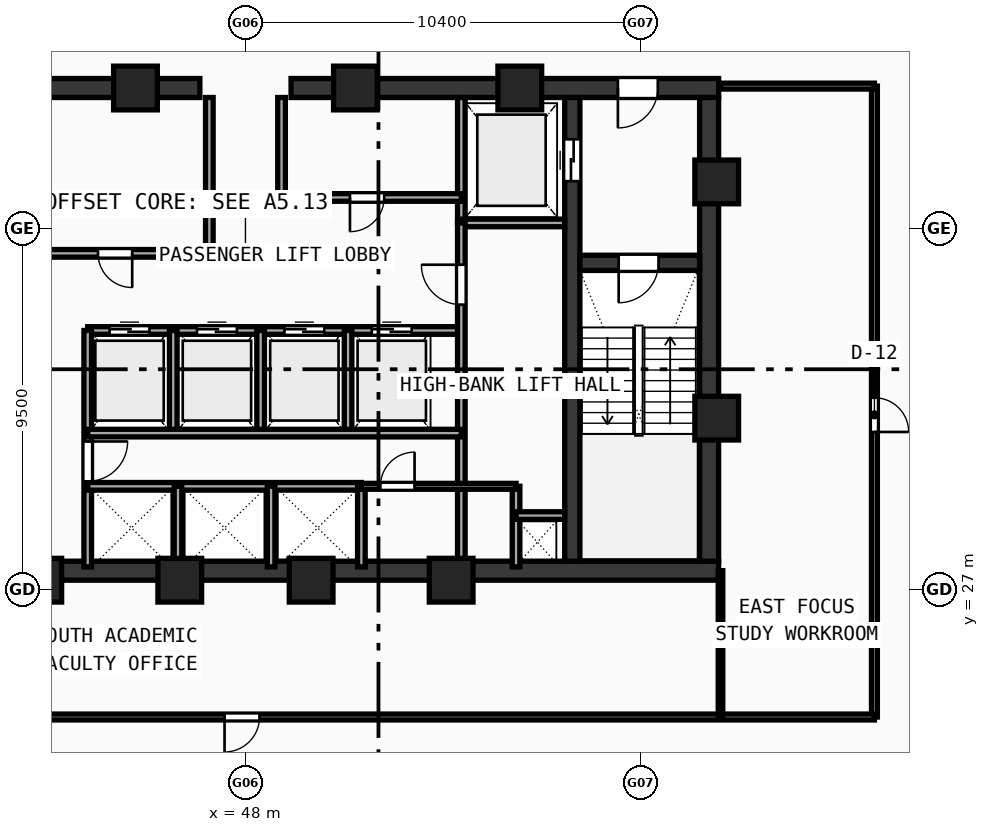
"""IFC4 building model, lengths in metres.
Left out: names, types, materials, properties, quantities, classifications, styles, units other than length and angle.
Written with IfcOpenShell. Run it as: python <this file> out.ifc"""

import sys

from ifc_helpers import new_model, si_unit, direction, frame, frame_2d, origin, origin_with_axes, origin_2d, place, context, subcontext, project, spatial, rectangle, hollow_rectangle, extrude, source, transform, mapped, element, fill, save


model = new_model("IFC4")
c1 = context("Model", 3, precision=1e-05, world=origin(), true_north=direction((0.0, 1.0)))
c2 = subcontext(c1, "Body", "Model", "MODEL_VIEW")
j1 = project(units=[si_unit("LENGTHUNIT", "METRE"), si_unit("PLANEANGLEUNIT", "RADIAN")], contexts=[c1])
p1 = place(None, origin())
s1 = spatial("IfcSite", under=j1, at=p1, CompositionType="ELEMENT")
p2 = place(p1, origin())
s2 = spatial("IfcBuilding", under=s1, at=p2, CompositionType="ELEMENT")
p3 = place(p2, frame((0.0, 0.0, 199.96)))
s3 = spatial("IfcBuildingStorey", under=s2, at=p3, CompositionType="ELEMENT", Elevation=199.96)
p4 = place(p3, frame((35.55, 27.5, 0.0), z_axis=(0.0, 0.0, 1.0), x_axis=(1.0, 0.0, 0.0)))
e1 = element("IfcWall", 1, at=p4, inside=s3, PredefinedType="SHEAR", context=c2, shape_type="SweptSolid", body=[
    extrude(rectangle(XDim=24.9, YDim=0.5, at=frame_2d((12.45, 0.0))), origin(), (0.0, 0.0, 1.0), 3.54),
])
p5 = place(p3, frame((35.55, 40.2, 0.0), z_axis=(0.0, 0.0, 1.0), x_axis=(1.0, 0.0, 0.0)))
e2 = element("IfcWall", 2, at=p5, inside=s3, PredefinedType="SHEAR", context=c2, shape_type="SweptSolid", body=[
    extrude(rectangle(XDim=11.25, YDim=0.5, at=frame_2d((5.625, 0.0))), origin(), (0.0, 0.0, 1.0), 3.54),
])
p6 = place(p5, frame((1.6, 0.0, 0.0)))
e3 = element("IfcOpeningElement", 3, at=p6, cuts=e2, PredefinedType="OPENING", context=c2, shape_type="SweptSolid", body=[
    extrude(rectangle(XDim=1.05, YDim=2.1, at=frame_2d((0.525, 1.05))), frame((0.0, 0.26, 0.0), z_axis=(0.0, -1.0, 0.0), x_axis=(1.0, 0.0, 0.0)), (0.0, 0.0, 1.0), 0.52),
])
p7 = place(p3, frame((49.2, 40.2, 0.0), z_axis=(0.0, 0.0, 1.0), x_axis=(1.0, 0.0, 0.0)))
e4 = element("IfcWall", 4, at=p7, inside=s3, PredefinedType="SHEAR", context=c2, shape_type="SweptSolid", body=[
    extrude(rectangle(XDim=11.25, YDim=0.5, at=frame_2d((5.625, 0.0))), origin(), (0.0, 0.0, 1.0), 3.54),
])
p8 = place(p7, frame((8.6, 0.0, 0.0)))
e5 = element("IfcOpeningElement", 5, at=p8, cuts=e4, PredefinedType="OPENING", context=c2, shape_type="SweptSolid", body=[
    extrude(rectangle(XDim=1.05, YDim=2.1, at=frame_2d((0.525, 1.05))), frame((0.0, 0.26, 0.0), z_axis=(0.0, -1.0, 0.0), x_axis=(1.0, 0.0, 0.0)), (0.0, 0.0, 1.0), 0.52),
])
p9 = place(p3, frame((60.2, 27.75, 0.0), z_axis=(0.0, 0.0, 1.0), x_axis=(0.0, 1.0, 0.0)))
e6 = element("IfcWall", 6, at=p9, inside=s3, PredefinedType="SHEAR", context=c2, shape_type="SweptSolid", body=[
    extrude(rectangle(XDim=12.2, YDim=0.5, at=frame_2d((6.1, 0.0))), origin(), (0.0, 0.0, 1.0), 3.54),
])
p10 = place(p3, frame((56.6, 27.75, 0.0), z_axis=(0.0, 0.0, 1.0), x_axis=(0.0, 1.0, 0.0)))
e7 = element("IfcWall", 7, at=p10, inside=s3, PredefinedType="SHEAR", context=c2, shape_type="SweptSolid", body=[
    extrude(rectangle(XDim=12.2, YDim=0.4, at=frame_2d((6.1, 0.0))), origin(), (0.0, 0.0, 1.0), 3.54),
])
p11 = place(p10, frame((10.0, 0.0, 0.0)))
e8 = element("IfcOpeningElement", 8, at=p11, cuts=e7, PredefinedType="OPENING", context=c2, shape_type="SweptSolid", body=[
    extrude(rectangle(XDim=1.1, YDim=2.1, at=frame_2d((0.55, 1.05))), frame((0.0, 0.21, 0.0), z_axis=(0.0, -1.0, 0.0), x_axis=(1.0, 0.0, 0.0)), (0.0, 0.0, 1.0), 0.42),
])
p12 = place(p3, frame((56.8, 35.6, 0.0), z_axis=(0.0, 0.0, 1.0), x_axis=(1.0, 0.0, 0.0)))
e9 = element("IfcWall", 9, at=p12, inside=s3, PredefinedType="SHEAR", context=c2, shape_type="SweptSolid", body=[
    extrude(rectangle(XDim=3.15, YDim=0.4, at=frame_2d((1.575, 0.0))), origin(), (0.0, 0.0, 1.0), 3.54),
])
p13 = place(p12, frame((1.02, 0.0, 0.0)))
e10 = element("IfcOpeningElement", 10, at=p13, cuts=e9, PredefinedType="OPENING", context=c2, shape_type="SweptSolid", body=[
    extrude(rectangle(XDim=1.05, YDim=2.1, at=frame_2d((0.525, 1.05))), frame((0.0, 0.21, 0.0), z_axis=(0.0, -1.0, 0.0), x_axis=(1.0, 0.0, 0.0)), (0.0, 0.0, 1.0), 0.42),
])
m1 = source(origin(), c2, "Body", "SweptSolid", [
    extrude(hollow_rectangle(XDim=1.15, YDim=1.15, WallThickness=0.048, at=origin_2d()), origin(), (0.0, 0.0, 1.0), 3.8),
])
for number, where, z_axis, x_axis in (
    (11, (42.588, 27.25, -0.26), (0.0, 0.0, 1.0), (1.0, 0.0, 0.0)),
    (12, (46.272, 27.25, -0.26), (0.0, 0.0, 1.0), (1.0, 0.0, 0.0)),
    (13, (49.729, 27.25, -0.26), (0.0, 0.0, 1.0), (1.0, 0.0, 0.0)),
    (14, (53.412, 27.25, -0.26), (0.0, 0.0, 1.0), (1.0, 0.0, 0.0)),
    (15, (60.4, 31.513, -0.26), (0.0, 0.0, 1.0), (1.0, 0.0, 0.0)),
    (16, (60.4, 37.729, -0.26), (0.0, 0.0, 1.0), (1.0, 0.0, 0.0)),
    (17, (55.219, 40.2, -0.26), (0.0, 0.0, 1.0), (1.0, 0.0, 0.0)),
    (18, (50.894, 40.2, -0.26), (0.0, 0.0, 1.0), (1.0, 0.0, 0.0)),
    (19, (45.106, 40.2, -0.26), (0.0, 0.0, 1.0), (1.0, 0.0, 0.0)),
):
    element("IfcColumn", number, at=place(p3, frame(where, z_axis=z_axis, x_axis=x_axis)), inside=s3, PredefinedType="COLUMN", context=c2, shape_type="MappedRepresentation", body=[
        mapped(m1, transform((0.0, 0.0, 0.0), scale=1.0)),
    ])
p14 = place(p3, frame((53.68, 36.65, 0.0), z_axis=(0.0, 0.0, 1.0), x_axis=(0.0, 1.0, 0.0)))
e20 = element("IfcWall", 20, at=p14, inside=s3, PredefinedType="SOLIDWALL", context=c2, shape_type="SweptSolid", body=[
    extrude(rectangle(XDim=3.3, YDim=0.2, at=frame_2d((1.65, 0.0))), origin(), (0.0, 0.0, 1.0), 3.54),
])
p15 = place(p3, frame((53.68, 36.65, 0.0), z_axis=(0.0, 0.0, 1.0), x_axis=(1.0, 0.0, 0.0)))
e21 = element("IfcWall", 21, at=p15, inside=s3, PredefinedType="SOLIDWALL", context=c2, shape_type="SweptSolid", body=[
    extrude(rectangle(XDim=2.72, YDim=0.2, at=frame_2d((1.36, 0.0))), origin(), (0.0, 0.0, 1.0), 3.54),
])
p16 = place(p3, frame((42.32, 35.85, 0.0), z_axis=(0.0, 0.0, 1.0), x_axis=(1.0, 0.0, 0.0)))
e22 = element("IfcWall", 22, at=p16, inside=s3, PredefinedType="SOLIDWALL", context=c2, shape_type="SweptSolid", body=[
    extrude(rectangle(XDim=4.73, YDim=0.2, at=frame_2d((2.365, 0.0))), origin(), (0.0, 0.0, 1.0), 3.54),
])
p17 = place(p16, frame((1.8, 0.0, 0.0)))
e23 = element("IfcOpeningElement", 23, at=p17, cuts=e22, PredefinedType="OPENING", context=c2, shape_type="SweptSolid", body=[
    extrude(rectangle(XDim=0.9, YDim=2.1, at=frame_2d((0.45, 1.05))), frame((0.0, 0.11, 0.0), z_axis=(0.0, -1.0, 0.0), x_axis=(1.0, 0.0, 0.0)), (0.0, 0.0, 1.0), 0.22),
])
p18 = place(p3, frame((48.95, 37.32, 0.0), z_axis=(0.0, 0.0, 1.0), x_axis=(1.0, 0.0, 0.0)))
e24 = element("IfcWall", 24, at=p18, inside=s3, PredefinedType="SOLIDWALL", context=c2, shape_type="SweptSolid", body=[
    extrude(rectangle(XDim=4.73, YDim=0.2, at=frame_2d((2.365, 0.0))), origin(), (0.0, 0.0, 1.0), 3.54),
])
p19 = place(p18, frame((1.8, 0.0, 0.0)))
e25 = element("IfcOpeningElement", 25, at=p19, cuts=e24, PredefinedType="OPENING", context=c2, shape_type="SweptSolid", body=[
    extrude(rectangle(XDim=0.9, YDim=2.1, at=frame_2d((0.45, 1.05))), frame((0.0, 0.11, 0.0), z_axis=(0.0, -1.0, 0.0), x_axis=(1.0, 0.0, 0.0)), (0.0, 0.0, 1.0), 0.22),
])
p20 = place(p3, frame((47.05, 35.85, 0.0), z_axis=(0.0, 0.0, 1.0), x_axis=(0.0, 1.0, 0.0)))
e26 = element("IfcWall", 26, at=p20, inside=s3, PredefinedType="SOLIDWALL", context=c2, shape_type="SweptSolid", body=[
    extrude(rectangle(XDim=4.1, YDim=0.2, at=frame_2d((2.05, 0.0))), origin(), (0.0, 0.0, 1.0), 3.54),
])
p21 = place(p3, frame((48.95, 37.32, 0.0), z_axis=(0.0, 0.0, 1.0), x_axis=(0.0, 1.0, 0.0)))
e27 = element("IfcWall", 27, at=p21, inside=s3, PredefinedType="SOLIDWALL", context=c2, shape_type="SweptSolid", body=[
    extrude(rectangle(XDim=2.63, YDim=0.2, at=frame_2d((1.315, 0.0))), origin(), (0.0, 0.0, 1.0), 3.54),
])
p22 = place(p3, frame((43.85, 33.82, 0.0), z_axis=(0.0, 0.0, 1.0), x_axis=(1.0, 0.0, 0.0)))
e28 = element("IfcWall", 28, at=p22, inside=s3, PredefinedType="SOLIDWALL", context=c2, shape_type="SweptSolid", body=[
    extrude(rectangle(XDim=9.83, YDim=0.2, at=frame_2d((4.915, 0.0))), origin(), (0.0, 0.0, 1.0), 3.54),
])
p23 = place(p22, frame((0.575, 0.0, 0.0)))
e29 = element("IfcOpeningElement", 29, at=p23, cuts=e28, PredefinedType="OPENING", context=c2, shape_type="SweptSolid", body=[
    extrude(rectangle(XDim=1.05, YDim=2.1, at=frame_2d((0.525, 1.05))), frame((0.0, 0.11, 0.0), z_axis=(0.0, -1.0, 0.0), x_axis=(1.0, 0.0, 0.0)), (0.0, 0.0, 1.0), 0.22),
])
p24 = place(p22, frame((2.875, 0.0, 0.0)))
e30 = element("IfcOpeningElement", 30, at=p24, cuts=e28, PredefinedType="OPENING", context=c2, shape_type="SweptSolid", body=[
    extrude(rectangle(XDim=1.05, YDim=2.1, at=frame_2d((0.525, 1.05))), frame((0.0, 0.11, 0.0), z_axis=(0.0, -1.0, 0.0), x_axis=(1.0, 0.0, 0.0)), (0.0, 0.0, 1.0), 0.22),
])
p25 = place(p22, frame((5.175, 0.0, 0.0)))
e31 = element("IfcOpeningElement", 31, at=p25, cuts=e28, PredefinedType="OPENING", context=c2, shape_type="SweptSolid", body=[
    extrude(rectangle(XDim=1.05, YDim=2.1, at=frame_2d((0.525, 1.05))), frame((0.0, 0.11, 0.0), z_axis=(0.0, -1.0, 0.0), x_axis=(1.0, 0.0, 0.0)), (0.0, 0.0, 1.0), 0.22),
])
p26 = place(p22, frame((7.475, 0.0, 0.0)))
e32 = element("IfcOpeningElement", 32, at=p26, cuts=e28, PredefinedType="OPENING", context=c2, shape_type="SweptSolid", body=[
    extrude(rectangle(XDim=1.05, YDim=2.1, at=frame_2d((0.525, 1.05))), frame((0.0, 0.11, 0.0), z_axis=(0.0, -1.0, 0.0), x_axis=(1.0, 0.0, 0.0)), (0.0, 0.0, 1.0), 0.22),
])
p27 = place(p3, frame((43.85, 27.6, 0.0), z_axis=(0.0, 0.0, 1.0), x_axis=(0.0, 1.0, 0.0)))
e33 = element("IfcWall", 33, at=p27, inside=s3, PredefinedType="SOLIDWALL", context=c2, shape_type="SweptSolid", body=[
    extrude(rectangle(XDim=6.22, YDim=0.2, at=frame_2d((3.11, 0.0))), origin(), (0.0, 0.0, 1.0), 3.54),
])
p28 = place(p27, frame((2.25, 0.0, 0.0)))
e34 = element("IfcOpeningElement", 34, at=p28, cuts=e33, PredefinedType="OPENING", context=c2, shape_type="SweptSolid", body=[
    extrude(rectangle(XDim=1.05, YDim=2.1, at=frame_2d((0.525, 1.05))), frame((0.0, 0.11, 0.0), z_axis=(0.0, -1.0, 0.0), x_axis=(1.0, 0.0, 0.0)), (0.0, 0.0, 1.0), 0.22),
])
p29 = place(p3, frame((53.68, 27.6, 0.0), z_axis=(0.0, 0.0, 1.0), x_axis=(0.0, 1.0, 0.0)))
e35 = element("IfcWall", 35, at=p29, inside=s3, PredefinedType="SOLIDWALL", context=c2, shape_type="SweptSolid", body=[
    extrude(rectangle(XDim=9.05, YDim=0.2, at=frame_2d((4.525, 0.0))), origin(), (0.0, 0.0, 1.0), 3.54),
])
p30 = place(p29, frame((6.9, 0.0, 0.0)))
e36 = element("IfcOpeningElement", 36, at=p30, cuts=e35, PredefinedType="OPENING", context=c2, shape_type="SweptSolid", body=[
    extrude(rectangle(XDim=1.05, YDim=2.1, at=frame_2d((0.525, 1.05))), frame((0.0, 0.11, 0.0), z_axis=(0.0, -1.0, 0.0), x_axis=(1.0, 0.0, 0.0)), (0.0, 0.0, 1.0), 0.22),
])
for number, where, z_axis, x_axis in (
    (37, (46.1, 31.12, 0.0), (0.0, 0.0, 1.0), (0.0, 1.0, 0.0)),
    (38, (48.4, 31.12, 0.0), (0.0, 0.0, 1.0), (0.0, 1.0, 0.0)),
    (39, (50.7, 31.12, 0.0), (0.0, 0.0, 1.0), (0.0, 1.0, 0.0)),
):
    element("IfcWall", number, at=place(p3, frame(where, z_axis=z_axis, x_axis=x_axis)), inside=s3, PredefinedType="SOLIDWALL", context=c2, shape_type="SweptSolid", body=[
        extrude(rectangle(XDim=2.7, YDim=0.2, at=frame_2d((1.35, 0.0))), origin(), (0.0, 0.0, 1.0), 3.54),
    ])
p31 = place(p3, frame((43.85, 29.72, 0.0), z_axis=(0.0, 0.0, 1.0), x_axis=(1.0, 0.0, 0.0)))
e40 = element("IfcWall", 40, at=p31, inside=s3, PredefinedType="SOLIDWALL", context=c2, shape_type="SweptSolid", body=[
    extrude(rectangle(XDim=7.2, YDim=0.2, at=frame_2d((3.6, 0.0))), origin(), (0.0, 0.0, 1.0), 3.54),
])
p32 = place(p3, frame((51.05, 27.6, 0.0), z_axis=(0.0, 0.0, 1.0), x_axis=(0.0, 1.0, 0.0)))
e41 = element("IfcWall", 41, at=p32, inside=s3, PredefinedType="SOLIDWALL", context=c2, shape_type="SweptSolid", body=[
    extrude(rectangle(XDim=2.12, YDim=0.2, at=frame_2d((1.06, 0.0))), origin(), (0.0, 0.0, 1.0), 3.54),
])
p33 = place(p3, frame((43.85, 31.12, 0.0), z_axis=(0.0, 0.0, 1.0), x_axis=(1.0, 0.0, 0.0)))
e42 = element("IfcWall", 42, at=p33, inside=s3, PredefinedType="SOLIDWALL", context=c2, shape_type="SweptSolid", body=[
    extrude(rectangle(XDim=9.83, YDim=0.2, at=frame_2d((4.915, 0.0))), origin(), (0.0, 0.0, 1.0), 3.54),
])
for number, where, z_axis, x_axis in (
    (43, (46.225, 27.6, 0.0), (0.0, 0.0, 1.0), (0.0, 1.0, 0.0)),
    (44, (48.675, 27.6, 0.0), (0.0, 0.0, 1.0), (0.0, 1.0, 0.0)),
    (45, (55.12, 27.6, 0.0), (0.0, 0.0, 1.0), (0.0, 1.0, 0.0)),
):
    element("IfcWall", number, at=place(p3, frame(where, z_axis=z_axis, x_axis=x_axis)), inside=s3, PredefinedType="SOLIDWALL", context=c2, shape_type="SweptSolid", body=[
        extrude(rectangle(XDim=2.12, YDim=0.2, at=frame_2d((1.06, 0.0))), origin(), (0.0, 0.0, 1.0), 3.54),
    ])
p34 = place(p3, frame((55.12, 28.95, 0.0), z_axis=(0.0, 0.0, 1.0), x_axis=(1.0, 0.0, 0.0)))
e46 = element("IfcWall", 46, at=p34, inside=s3, PredefinedType="SOLIDWALL", context=c2, shape_type="SweptSolid", body=[
    extrude(rectangle(XDim=1.28, YDim=0.2, at=frame_2d((0.64, 0.0))), origin(), (0.0, 0.0, 1.0), 3.54),
])
p35 = place(p3, frame((51.05, 29.72, 0.0), z_axis=(0.0, 0.0, 1.0), x_axis=(1.0, 0.0, 0.0)))
e47 = element("IfcWall", 47, at=p35, inside=s3, PredefinedType="PARTITIONING", context=c2, shape_type="SweptSolid", body=[
    extrude(rectangle(XDim=4.07, YDim=0.155, at=frame_2d((2.035, 0.0))), origin(), (0.0, 0.0, 1.0), 3.54),
])
p36 = place(p35, frame((0.5, 0.0, 0.0)))
e48 = element("IfcOpeningElement", 48, at=p36, cuts=e47, PredefinedType="OPENING", context=c2, shape_type="SweptSolid", body=[
    extrude(rectangle(XDim=0.9, YDim=2.1, at=frame_2d((0.45, 1.05))), frame((0.0, 0.087, 0.0), z_axis=(0.0, -1.0, 0.0), x_axis=(1.0, 0.0, 0.0)), (0.0, 0.0, 1.0), 0.175),
])
p37 = place(p3, frame((64.55, 23.65, 0.0), z_axis=(0.0, 0.0, 1.0), x_axis=(0.0, 1.0, 0.0)))
e49 = element("IfcWall", 49, at=p37, inside=s3, PredefinedType="PARTITIONING", context=c2, shape_type="SweptSolid", body=[
    extrude(rectangle(XDim=16.6, YDim=0.155, at=frame_2d((8.3, 0.0))), origin(), (0.0, 0.0, 1.0), 2.89),
])
p38 = place(p37, frame((7.5, 0.0, 0.0)))
e50 = element("IfcOpeningElement", 50, at=p38, cuts=e49, PredefinedType="OPENING", context=c2, shape_type="SweptSolid", body=[
    extrude(rectangle(XDim=0.9, YDim=2.08, at=frame_2d((0.45, 1.04))), frame((0.0, 0.087, 0.0), z_axis=(0.0, -1.0, 0.0), x_axis=(1.0, 0.0, 0.0)), (0.0, 0.0, 1.0), 0.175),
])
p39 = place(p3, frame((31.45, 23.65, 0.0), z_axis=(0.0, 0.0, 1.0), x_axis=(1.0, 0.0, 0.0)))
e51 = element("IfcWall", 51, at=p39, inside=s3, PredefinedType="PARTITIONING", context=c2, shape_type="SweptSolid", body=[
    extrude(rectangle(XDim=33.1, YDim=0.155, at=frame_2d((16.55, 0.0))), origin(), (0.0, 0.0, 1.0), 2.89),
])
p40 = place(p39, frame((16.0, 0.0, 0.0)))
e52 = element("IfcOpeningElement", 52, at=p40, cuts=e51, PredefinedType="OPENING", context=c2, shape_type="SweptSolid", body=[
    extrude(rectangle(XDim=0.92, YDim=2.1, at=frame_2d((0.46, 1.05))), frame((0.0, 0.087, 0.0), z_axis=(0.0, -1.0, 0.0), x_axis=(1.0, 0.0, 0.0)), (0.0, 0.0, 1.0), 0.175),
])
p41 = place(p3, frame((60.5, 40.25, 0.0), z_axis=(0.0, 0.0, 1.0), x_axis=(1.0, 0.0, 0.0)))
e53 = element("IfcWall", 53, at=p41, inside=s3, PredefinedType="PARTITIONING", context=c2, shape_type="SweptSolid", body=[
    extrude(rectangle(XDim=4.05, YDim=0.155, at=frame_2d((2.025, 0.0))), origin(), (0.0, 0.0, 1.0), 3.54),
])
p42 = place(p3, frame((60.5, 23.65, 0.0), z_axis=(0.0, 0.0, 1.0), x_axis=(0.0, 1.0, 0.0)))
e54 = element("IfcWall", 54, at=p42, inside=s3, PredefinedType="PARTITIONING", context=c2, shape_type="SweptSolid", body=[
    extrude(rectangle(XDim=3.85, YDim=0.12, at=frame_2d((1.925, 0.0))), origin(), (0.0, 0.0, 1.0), 3.14),
])
m2 = source(origin(), c2, "Body", "SweptSolid", [
    extrude(rectangle(XDim=1.05, YDim=2.1, at=frame_2d((0.525, 1.05))), frame((0.0, 0.025, 0.0), z_axis=(0.0, -1.0, 0.0), x_axis=(1.0, 0.0, 0.0)), (0.0, 0.0, 1.0), 0.05),
])
p43 = place(p13, frame((1.05, 0.0, 0.0), z_axis=(0.0, 0.0, 1.0), x_axis=(-1.0, 0.0, 0.0)))
e55 = element("IfcDoor", 55, at=p43, inside=s3, OperationType="SINGLE_SWING_RIGHT", PredefinedType="DOOR", context=c2, shape_type="MappedRepresentation", body=[
    mapped(m2, transform((0.0, 0.0, 0.0), scale=1.0)),
])
fill(e10, e55)
p44 = place(p8, frame((1.05, 0.0, 0.0), z_axis=(0.0, 0.0, 1.0), x_axis=(-1.0, 0.0, 0.0)))
e56 = element("IfcDoor", 56, at=p44, inside=s3, OperationType="SINGLE_SWING_RIGHT", PredefinedType="DOOR", context=c2, shape_type="MappedRepresentation", body=[
    mapped(m2, transform((0.0, 0.0, 0.0), scale=1.0)),
])
fill(e5, e56)
m3 = source(origin(), c2, "Body", "SweptSolid", [
    extrude(rectangle(XDim=1.1, YDim=2.1, at=frame_2d((0.55, 1.05))), frame((0.0, 0.025, 0.0), z_axis=(0.0, -1.0, 0.0), x_axis=(1.0, 0.0, 0.0)), (0.0, 0.0, 1.0), 0.05),
])
p45 = place(p11, origin_with_axes())
e57 = element("IfcDoor", 57, at=p45, inside=s3, OperationType="DOUBLE_DOOR_SLIDING", PredefinedType="DOOR", context=c2, shape_type="MappedRepresentation", body=[
    mapped(m3, transform((0.0, 0.0, 0.0), scale=1.0)),
])
fill(e8, e57)
m4 = source(origin(), c2, "Body", "SweptSolid", [
    extrude(rectangle(XDim=0.9, YDim=2.1, at=frame_2d((0.45, 1.05))), frame((0.0, 0.025, 0.0), z_axis=(0.0, -1.0, 0.0), x_axis=(1.0, 0.0, 0.0)), (0.0, 0.0, 1.0), 0.05),
])
p46 = place(p17, frame((0.9, 0.0, 0.0), z_axis=(0.0, 0.0, 1.0), x_axis=(-1.0, 0.0, 0.0)))
e58 = element("IfcDoor", 58, at=p46, inside=s3, OperationType="SINGLE_SWING_LEFT", PredefinedType="DOOR", context=c2, shape_type="MappedRepresentation", body=[
    mapped(m4, transform((0.0, 0.0, 0.0), scale=1.0)),
])
fill(e23, e58)
p47 = place(p19, frame((0.9, 0.0, 0.0), z_axis=(0.0, 0.0, 1.0), x_axis=(-1.0, 0.0, 0.0)))
e59 = element("IfcDoor", 59, at=p47, inside=s3, OperationType="SINGLE_SWING_RIGHT", PredefinedType="DOOR", context=c2, shape_type="MappedRepresentation", body=[
    mapped(m4, transform((0.0, 0.0, 0.0), scale=1.0)),
])
fill(e25, e59)
p48 = place(p23, origin_with_axes())
e60 = element("IfcDoor", 60, at=p48, inside=s3, OperationType="DOUBLE_DOOR_SLIDING", PredefinedType="DOOR", context=c2, shape_type="MappedRepresentation", body=[
    mapped(m2, transform((0.0, 0.0, 0.0), scale=1.0)),
])
fill(e29, e60)
p49 = place(p24, origin_with_axes())
e61 = element("IfcDoor", 61, at=p49, inside=s3, OperationType="DOUBLE_DOOR_SLIDING", PredefinedType="DOOR", context=c2, shape_type="MappedRepresentation", body=[
    mapped(m2, transform((0.0, 0.0, 0.0), scale=1.0)),
])
fill(e30, e61)
p50 = place(p25, origin_with_axes())
e62 = element("IfcDoor", 62, at=p50, inside=s3, OperationType="DOUBLE_DOOR_SLIDING", PredefinedType="DOOR", context=c2, shape_type="MappedRepresentation", body=[
    mapped(m2, transform((0.0, 0.0, 0.0), scale=1.0)),
])
fill(e31, e62)
p51 = place(p26, origin_with_axes())
e63 = element("IfcDoor", 63, at=p51, inside=s3, OperationType="DOUBLE_DOOR_SLIDING", PredefinedType="DOOR", context=c2, shape_type="MappedRepresentation", body=[
    mapped(m2, transform((0.0, 0.0, 0.0), scale=1.0)),
])
fill(e32, e63)
p52 = place(p28, frame((1.05, 0.0, 0.0), z_axis=(0.0, 0.0, 1.0), x_axis=(-1.0, 0.0, 0.0)))
e64 = element("IfcDoor", 64, at=p52, inside=s3, OperationType="SINGLE_SWING_LEFT", PredefinedType="DOOR", context=c2, shape_type="MappedRepresentation", body=[
    mapped(m2, transform((0.0, 0.0, 0.0), scale=1.0)),
])
fill(e34, e64)
p53 = place(p30, origin_with_axes())
e65 = element("IfcDoor", 65, at=p53, inside=s3, OperationType="SINGLE_SWING_RIGHT", PredefinedType="DOOR", context=c2, shape_type="MappedRepresentation", body=[
    mapped(m2, transform((0.0, 0.0, 0.0), scale=1.0)),
])
fill(e36, e65)
p54 = place(p36, origin_with_axes())
e66 = element("IfcDoor", 66, at=p54, inside=s3, OperationType="SINGLE_SWING_RIGHT", PredefinedType="DOOR", context=c2, shape_type="MappedRepresentation", body=[
    mapped(m4, transform((0.0, 0.0, 0.0), scale=1.0)),
])
fill(e48, e66)
m5 = source(origin(), c2, "Body", "SweptSolid", [
    extrude(rectangle(XDim=0.92, YDim=2.1, at=frame_2d((0.46, 1.05))), frame((0.0, 0.025, 0.0), z_axis=(0.0, -1.0, 0.0), x_axis=(1.0, 0.0, 0.0)), (0.0, 0.0, 1.0), 0.05),
])
p55 = place(p40, frame((0.92, 0.0, 0.0), z_axis=(0.0, 0.0, 1.0), x_axis=(-1.0, 0.0, 0.0)))
e67 = element("IfcDoor", 67, at=p55, inside=s3, OperationType="SINGLE_SWING_RIGHT", PredefinedType="DOOR", context=c2, shape_type="MappedRepresentation", body=[
    mapped(m5, transform((0.0, 0.0, 0.0), scale=1.0)),
])
fill(e52, e67)
m6 = source(origin(), c2, "Body", "SweptSolid", [
    extrude(rectangle(XDim=0.9, YDim=2.08, at=frame_2d((0.45, 1.04))), frame((0.0, 0.025, 0.0), z_axis=(0.0, -1.0, 0.0), x_axis=(1.0, 0.0, 0.0)), (0.0, 0.0, 1.0), 0.05),
])
p56 = place(p38, frame((0.9, 0.0, 0.0), z_axis=(0.0, 0.0, 1.0), x_axis=(-1.0, 0.0, 0.0)))
e68 = element("IfcDoor", 68, at=p56, inside=s3, OperationType="SINGLE_SWING_RIGHT", PredefinedType="DOOR", context=c2, shape_type="MappedRepresentation", body=[
    mapped(m6, transform((0.0, 0.0, 0.0), scale=1.0)),
])
fill(e50, e68)
save(model, sys.argv[1])
